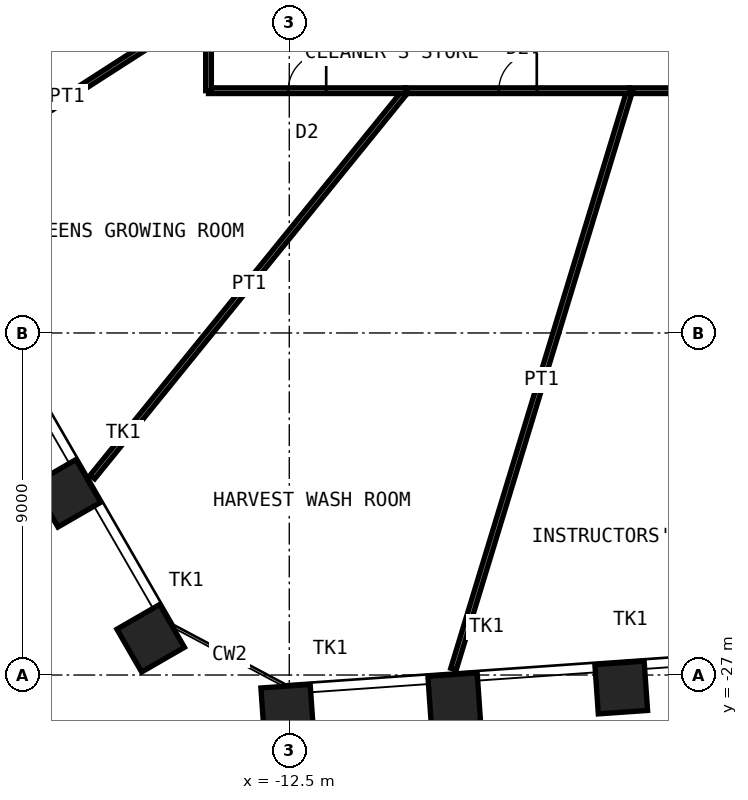
"""IFC4 building model, lengths in metres.
Left out: names, types, materials, properties, quantities, classifications, styles, units other than length and angle.
Written with IfcOpenShell. Run it as: python <this file> out.ifc"""

import sys

from ifc_helpers import new_model, si_unit, direction, frame, frame_2d, origin, origin_2d, place, context, subcontext, project, spatial, rectangle, hollow_rectangle, extrude, element, fill, save


model = new_model("IFC4")
c1 = context("Model", 3, precision=1e-05, world=origin(), true_north=direction((0.0, 1.0)))
c2 = subcontext(c1, "Body", "Model", "MODEL_VIEW")
j1 = project(units=[si_unit("LENGTHUNIT", "METRE"), si_unit("PLANEANGLEUNIT", "RADIAN")], contexts=[c1])
p1 = place(None, origin())
s1 = spatial("IfcSite", under=j1, at=p1, CompositionType="ELEMENT")
p2 = place(p1, origin())
s2 = spatial("IfcBuilding", under=s1, at=p2, CompositionType="ELEMENT")
p3 = place(p2, frame((0.0, 0.0, 92.0)))
s3 = spatial("IfcBuildingStorey", under=s2, at=p3, CompositionType="ELEMENT", Elevation=92.0)
for number, where, z_axis, x_axis in (
    (1, (-3.765, -27.329, 0.0), (0.0, 0.0, 1.0), (0.998, 0.07, 0.0)),
    (2, (-8.159, -27.636, 0.0), (0.0, 0.0, 1.0), (0.998, 0.07, 0.0)),
    (3, (-12.553, -27.944, 0.0), (0.0, 0.0, 1.0), (0.998, 0.07, 0.0)),
    (4, (-16.147, -26.033, 0.0), (0.0, 0.0, 1.0), (0.5, -0.866, 0.0)),
    (5, (-18.349, -22.218, 0.0), (0.0, 0.0, 1.0), (0.5, -0.866, 0.0)),
):
    element("IfcColumn", number, at=place(p3, frame(where, z_axis=z_axis, x_axis=x_axis)), inside=s3, PredefinedType="COLUMN", context=c2, shape_type="SweptSolid", body=[
        extrude(hollow_rectangle(XDim=1.3, YDim=1.3, WallThickness=0.1, at=origin_2d()), origin(), (0.0, 0.0, 1.0), 5.0),
    ])
p4 = place(p3, frame((-22.063, -14.185, 0.0), z_axis=(0.0, 0.0, 1.0), x_axis=(0.841147976126, 0.540805031651, 0.0)))
e6 = element("IfcWall", 6, at=p4, inside=s3, PredefinedType="PARTITIONING", context=c2, shape_type="SweptSolid", body=[
    extrude(rectangle(XDim=8.843, YDim=0.15, at=frame_2d((4.422, 0.0))), origin(), (0.0, 0.0, 1.0), 3.82),
])
p5 = place(p3, frame((0.256, -11.625, 0.0), z_axis=(0.0, 0.0, 1.0), x_axis=(-1.0, 0.0, 0.0)))
e7 = element("IfcWall", 7, at=p5, inside=s3, PredefinedType="PARTITIONING", context=c2, shape_type="SweptSolid", body=[
    extrude(rectangle(XDim=3.798, YDim=0.15, at=frame_2d((1.899, 0.0))), origin(), (0.0, 0.0, 1.0), 4.72),
])
p6 = place(p5, frame((1.399, 0.0, 0.0)))
e8 = element("IfcOpeningElement", 8, at=p6, cuts=e7, PredefinedType="OPENING", context=c2, shape_type="SweptSolid", body=[
    extrude(rectangle(XDim=1.0, YDim=2.4, at=frame_2d((0.5, 1.2))), frame((0.0, 0.085, 0.0), z_axis=(0.0, -1.0, 0.0), x_axis=(1.0, 0.0, 0.0)), (0.0, 0.0, 1.0), 0.17),
])
p7 = place(p3, frame((-8.179, -26.843, 0.0), z_axis=(0.0, 0.0, 1.0), x_axis=(0.291466333136, 0.956581087336, 0.0)))
e9 = element("IfcWall", 9, at=p7, inside=s3, PredefinedType="PARTITIONING", context=c2, shape_type="SweptSolid", body=[
    extrude(rectangle(XDim=15.908, YDim=0.15, at=frame_2d((7.954, 0.0))), origin(), (0.0, 0.0, 1.0), 3.82),
])
p8 = place(p3, frame((-3.542, -11.625, 0.0), z_axis=(0.0, 0.0, 1.0), x_axis=(-1.0, 0.0, 0.0)))
e10 = element("IfcWall", 10, at=p8, inside=s3, PredefinedType="PARTITIONING", context=c2, shape_type="SweptSolid", body=[
    extrude(rectangle(XDim=5.89, YDim=0.15, at=frame_2d((2.945, 0.0))), origin(), (0.0, 0.0, 1.0), 4.72),
])
p9 = place(p8, frame((2.445, 0.0, 0.0)))
e11 = element("IfcOpeningElement", 11, at=p9, cuts=e10, PredefinedType="OPENING", context=c2, shape_type="SweptSolid", body=[
    extrude(rectangle(XDim=1.0, YDim=2.4, at=frame_2d((0.5, 1.2))), frame((0.0, 0.085, 0.0), z_axis=(0.0, -1.0, 0.0), x_axis=(1.0, 0.0, 0.0)), (0.0, 0.0, 1.0), 0.17),
])
p10 = place(p3, frame((-17.68, -21.791, 0.0), z_axis=(0.0, 0.0, 1.0), x_axis=(0.630054650118, 0.776550795418, 0.0)))
e12 = element("IfcWall", 12, at=p10, inside=s3, PredefinedType="PARTITIONING", context=c2, shape_type="SweptSolid", body=[
    extrude(rectangle(XDim=13.091, YDim=0.15, at=frame_2d((6.545, 0.0))), origin(), (0.0, 0.0, 1.0), 3.52),
])
p11 = place(p3, frame((-9.432, -11.625, 0.0), z_axis=(0.0, 0.0, 1.0), x_axis=(-1.0, 0.0, 0.0)))
e13 = element("IfcWall", 13, at=p11, inside=s3, PredefinedType="PARTITIONING", context=c2, shape_type="SweptSolid", body=[
    extrude(rectangle(XDim=5.193, YDim=0.15, at=frame_2d((2.596, 0.0))), origin(), (0.0, 0.0, 1.0), 4.72),
])
p12 = place(p11, frame((2.096, 0.0, 0.0)))
e14 = element("IfcOpeningElement", 14, at=p12, cuts=e13, PredefinedType="OPENING", context=c2, shape_type="SweptSolid", body=[
    extrude(rectangle(XDim=1.0, YDim=2.4, at=frame_2d((0.5, 1.2))), frame((0.0, 0.085, 0.0), z_axis=(0.0, -1.0, 0.0), x_axis=(1.0, 0.0, 0.0)), (0.0, 0.0, 1.0), 0.17),
])
p13 = place(p3, frame((-14.625, -11.625, 0.0), z_axis=(0.0, 0.0, 1.0), x_axis=(0.0, 1.0, 0.0)))
e15 = element("IfcWall", 15, at=p13, inside=s3, PredefinedType="PARTITIONING", context=c2, shape_type="SweptSolid", body=[
    extrude(rectangle(XDim=2.222, YDim=0.15, at=frame_2d((1.111, 0.0))), origin(), (0.0, 0.0, 1.0), 4.72),
])
p14 = place(p9, origin())
e16 = element("IfcDoor", 16, at=p14, inside=s3, OperationType="SINGLE_SWING_LEFT", PredefinedType="DOOR", context=c2, shape_type="SweptSolid", body=[
    extrude(rectangle(XDim=1.0, YDim=2.4, at=frame_2d((0.5, 1.2))), frame((0.0, 0.025, 0.0), z_axis=(0.0, -1.0, 0.0), x_axis=(1.0, 0.0, 0.0)), (0.0, 0.0, 1.0), 0.05),
])
fill(e11, e16)
p15 = place(p12, origin())
e17 = element("IfcDoor", 17, at=p15, inside=s3, OperationType="SINGLE_SWING_LEFT", PredefinedType="DOOR", context=c2, shape_type="SweptSolid", body=[
    extrude(rectangle(XDim=1.0, YDim=2.4, at=frame_2d((0.5, 1.2))), frame((0.0, 0.025, 0.0), z_axis=(0.0, -1.0, 0.0), x_axis=(1.0, 0.0, 0.0)), (0.0, 0.0, 1.0), 0.05),
])
fill(e14, e17)
save(model, sys.argv[1])
